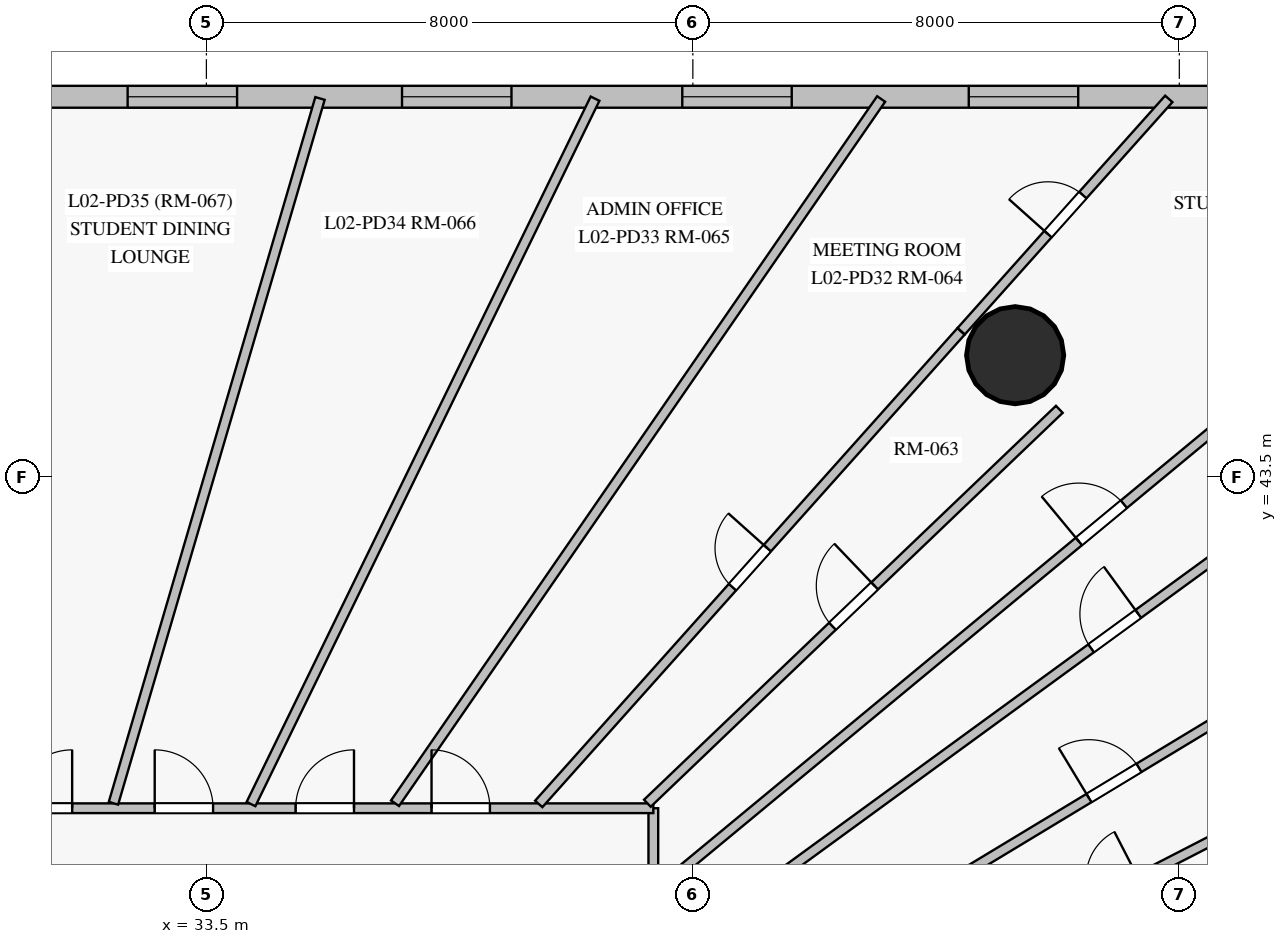
"""IFC4 building model, lengths in metres.
Left out: names, types, materials, properties, quantities, classifications, styles, units other than length and angle.
Written with IfcOpenShell. Run it as: python <this file> out.ifc"""

import sys

from ifc_helpers import new_model, si_unit, direction, frame, frame_2d, origin, origin_with_axes, origin_2d, place, context, subcontext, project, spatial, rectangle, circle, extrude, source, transform, mapped, element, fill, save


model = new_model("IFC4")
c1 = context("Model", 3, precision=1e-05, world=origin(), true_north=direction((0.0, 1.0)))
c2 = subcontext(c1, "Body", "Model", "MODEL_VIEW")
j1 = project(units=[si_unit("LENGTHUNIT", "METRE"), si_unit("PLANEANGLEUNIT", "RADIAN")], contexts=[c1])
p1 = place(None, origin())
s1 = spatial("IfcSite", under=j1, at=p1, CompositionType="ELEMENT")
p2 = place(p1, origin())
s2 = spatial("IfcBuilding", under=s1, at=p2, CompositionType="ELEMENT")
p3 = place(p2, frame((0.0, 0.0, 9.0)))
s3 = spatial("IfcBuildingStorey", under=s2, at=p3, CompositionType="ELEMENT", Elevation=9.0)
m1 = source(origin_with_axes(), c2, "Body", "SweptSolid", [
    extrude(circle(Radius=0.8, at=origin_2d()), origin(), (0.0, 0.0, 1.0), 4.5),
])
p4 = place(p3, frame((46.8, 45.5, 0.0), z_axis=(0.0, 0.0, 1.0), x_axis=(1.0, 0.0, 0.0)))
e1 = element("IfcColumn", 1, at=p4, inside=s3, PredefinedType="COLUMN", context=c2, shape_type="MappedRepresentation", body=[
    mapped(m1, transform((0.0, 0.0, 0.0), scale=1.0)),
])
p5 = place(p3, frame((54.6, 49.75, 0.0), z_axis=(0.0, 0.0, 1.0), x_axis=(-1.0, 0.0, 0.0)))
e2 = element("IfcWall", 2, at=p5, inside=s3, PredefinedType="SOLIDWALL", context=c2, shape_type="SweptSolid", body=[
    extrude(rectangle(XDim=49.25, YDim=0.36, at=frame_2d((24.625, 0.0))), origin(), (0.0, 0.0, 1.0), 4.2),
])
p6 = place(p5, frame((1.866, 0.0, 0.85)))
e3 = element("IfcOpeningElement", 3, at=p6, cuts=e2, PredefinedType="OPENING", context=c2, shape_type="SweptSolid", body=[
    extrude(rectangle(XDim=1.8, YDim=2.2, at=frame_2d((0.9, 1.1))), frame((0.0, 0.19, 0.0), z_axis=(0.0, -1.0, 0.0), x_axis=(1.0, 0.0, 0.0)), (0.0, 0.0, 1.0), 0.38),
])
p7 = place(p5, frame((6.763, 0.0, 0.85)))
e4 = element("IfcOpeningElement", 4, at=p7, cuts=e2, PredefinedType="OPENING", context=c2, shape_type="SweptSolid", body=[
    extrude(rectangle(XDim=1.8, YDim=2.2, at=frame_2d((0.9, 1.1))), frame((0.0, 0.19, 0.0), z_axis=(0.0, -1.0, 0.0), x_axis=(1.0, 0.0, 0.0)), (0.0, 0.0, 1.0), 0.38),
])
p8 = place(p5, frame((11.474, 0.0, 0.85)))
e5 = element("IfcOpeningElement", 5, at=p8, cuts=e2, PredefinedType="OPENING", context=c2, shape_type="SweptSolid", body=[
    extrude(rectangle(XDim=1.8, YDim=2.2, at=frame_2d((0.9, 1.1))), frame((0.0, 0.19, 0.0), z_axis=(0.0, -1.0, 0.0), x_axis=(1.0, 0.0, 0.0)), (0.0, 0.0, 1.0), 0.38),
])
p9 = place(p5, frame((16.083, 0.0, 0.85)))
e6 = element("IfcOpeningElement", 6, at=p9, cuts=e2, PredefinedType="OPENING", context=c2, shape_type="SweptSolid", body=[
    extrude(rectangle(XDim=1.8, YDim=2.2, at=frame_2d((0.9, 1.1))), frame((0.0, 0.19, 0.0), z_axis=(0.0, -1.0, 0.0), x_axis=(1.0, 0.0, 0.0)), (0.0, 0.0, 1.0), 0.38),
])
p10 = place(p5, frame((20.595, 0.0, 0.85)))
e7 = element("IfcOpeningElement", 7, at=p10, cuts=e2, PredefinedType="OPENING", context=c2, shape_type="SweptSolid", body=[
    extrude(rectangle(XDim=1.8, YDim=2.2, at=frame_2d((0.9, 1.1))), frame((0.0, 0.19, 0.0), z_axis=(0.0, -1.0, 0.0), x_axis=(1.0, 0.0, 0.0)), (0.0, 0.0, 1.0), 0.38),
])
p11 = place(p5, frame((24.23, 0.0, 0.85)))
e8 = element("IfcOpeningElement", 8, at=p11, cuts=e2, PredefinedType="OPENING", context=c2, shape_type="SweptSolid", body=[
    extrude(rectangle(XDim=1.8, YDim=2.2, at=frame_2d((0.9, 1.1))), frame((0.0, 0.19, 0.0), z_axis=(0.0, -1.0, 0.0), x_axis=(1.0, 0.0, 0.0)), (0.0, 0.0, 1.0), 0.38),
])
p12 = place(p5, frame((30.4, 0.0, 0.85)))
e9 = element("IfcOpeningElement", 9, at=p12, cuts=e2, PredefinedType="OPENING", context=c2, shape_type="SweptSolid", body=[
    extrude(rectangle(XDim=1.8, YDim=2.2, at=frame_2d((0.9, 1.1))), frame((0.0, 0.19, 0.0), z_axis=(0.0, -1.0, 0.0), x_axis=(1.0, 0.0, 0.0)), (0.0, 0.0, 1.0), 0.38),
])
p13 = place(p5, frame((35.42, 0.0, 0.85)))
e10 = element("IfcOpeningElement", 10, at=p13, cuts=e2, PredefinedType="OPENING", context=c2, shape_type="SweptSolid", body=[
    extrude(rectangle(XDim=1.8, YDim=2.2, at=frame_2d((0.9, 1.1))), frame((0.0, 0.19, 0.0), z_axis=(0.0, -1.0, 0.0), x_axis=(1.0, 0.0, 0.0)), (0.0, 0.0, 1.0), 0.38),
])
p14 = place(p5, frame((40.69, 0.0, 0.85)))
e11 = element("IfcOpeningElement", 11, at=p14, cuts=e2, PredefinedType="OPENING", context=c2, shape_type="SweptSolid", body=[
    extrude(rectangle(XDim=1.8, YDim=2.2, at=frame_2d((0.9, 1.1))), frame((0.0, 0.19, 0.0), z_axis=(0.0, -1.0, 0.0), x_axis=(1.0, 0.0, 0.0)), (0.0, 0.0, 1.0), 0.38),
])
p15 = place(p5, frame((45.58, 0.0, 0.85)))
e12 = element("IfcOpeningElement", 12, at=p15, cuts=e2, PredefinedType="OPENING", context=c2, shape_type="SweptSolid", body=[
    extrude(rectangle(XDim=1.8, YDim=2.2, at=frame_2d((0.9, 1.1))), frame((0.0, 0.19, 0.0), z_axis=(0.0, -1.0, 0.0), x_axis=(1.0, 0.0, 0.0)), (0.0, 0.0, 1.0), 0.38),
])
p16 = place(p3, frame((40.932, 36.712, 0.0), z_axis=(0.0, 0.0, 1.0), x_axis=(0.770350004389, 0.637621259635, 0.0)))
e13 = element("IfcWall", 13, at=p16, inside=s3, PredefinedType="PARTITIONING", context=c2, shape_type="SweptSolid", body=[
    extrude(rectangle(XDim=18.942, YDim=0.16, at=frame_2d((9.471, 0.0))), origin(), (0.0, 0.0, 1.0), 4.2),
])
p17 = place(p16, frame((8.979, 0.0, 0.0)))
e14 = element("IfcOpeningElement", 14, at=p17, cuts=e13, PredefinedType="OPENING", context=c2, shape_type="SweptSolid", body=[
    extrude(rectangle(XDim=0.96, YDim=2.15, at=frame_2d((0.48, 1.075))), frame((0.0, 0.09, 0.0), z_axis=(0.0, -1.0, 0.0), x_axis=(1.0, 0.0, 0.0)), (0.0, 0.0, 1.0), 0.18),
])
p18 = place(p3, frame((40.932, 35.49, 0.0), z_axis=(0.0, 0.0, 1.0), x_axis=(0.808014689356, 0.589162339076, 0.0)))
e15 = element("IfcWall", 15, at=p18, inside=s3, PredefinedType="PARTITIONING", context=c2, shape_type="SweptSolid", body=[
    extrude(rectangle(XDim=18.602, YDim=0.16, at=frame_2d((9.301, 0.0))), origin(), (0.0, 0.0, 1.0), 4.2),
])
p19 = place(p18, frame((8.808, 0.0, 0.0)))
e16 = element("IfcOpeningElement", 16, at=p19, cuts=e15, PredefinedType="OPENING", context=c2, shape_type="SweptSolid", body=[
    extrude(rectangle(XDim=0.96, YDim=2.15, at=frame_2d((0.48, 1.075))), frame((0.0, 0.09, 0.0), z_axis=(0.0, -1.0, 0.0), x_axis=(1.0, 0.0, 0.0)), (0.0, 0.0, 1.0), 0.18),
])
p20 = place(p3, frame((40.85, 38.05, 0.0), z_axis=(0.0, 0.0, 1.0), x_axis=(0.0, -1.0, 0.0)))
e17 = element("IfcWall", 17, at=p20, inside=s3, PredefinedType="PARTITIONING", context=c2, shape_type="SweptSolid", body=[
    extrude(rectangle(XDim=18.508, YDim=0.16, at=frame_2d((9.254, 0.0))), origin(), (0.0, 0.0, 1.0), 3.25),
])
p21 = place(p20, frame((13.87, 0.0, 0.0)))
e18 = element("IfcOpeningElement", 18, at=p21, cuts=e17, PredefinedType="OPENING", context=c2, shape_type="SweptSolid", body=[
    extrude(rectangle(XDim=0.96, YDim=2.15, at=frame_2d((0.48, 1.075))), frame((0.0, 0.09, 0.0), z_axis=(0.0, -1.0, 0.0), x_axis=(1.0, 0.0, 0.0)), (0.0, 0.0, 1.0), 0.18),
])
p22 = place(p20, frame((8.695, 0.0, 0.0)))
e19 = element("IfcOpeningElement", 19, at=p22, cuts=e17, PredefinedType="OPENING", context=c2, shape_type="SweptSolid", body=[
    extrude(rectangle(XDim=0.96, YDim=2.15, at=frame_2d((0.48, 1.075))), frame((0.0, 0.09, 0.0), z_axis=(0.0, -1.0, 0.0), x_axis=(1.0, 0.0, 0.0)), (0.0, 0.0, 1.0), 0.18),
])
p23 = place(p20, frame((6.334, 0.0, 0.0)))
e20 = element("IfcOpeningElement", 20, at=p23, cuts=e17, PredefinedType="OPENING", context=c2, shape_type="SweptSolid", body=[
    extrude(rectangle(XDim=0.96, YDim=2.15, at=frame_2d((0.48, 1.075))), frame((0.0, 0.09, 0.0), z_axis=(0.0, -1.0, 0.0), x_axis=(1.0, 0.0, 0.0)), (0.0, 0.0, 1.0), 0.18),
])
p24 = place(p20, frame((12.2, 0.0, 0.0)))
e21 = element("IfcOpeningElement", 21, at=p24, cuts=e17, PredefinedType="OPENING", context=c2, shape_type="SweptSolid", body=[
    extrude(rectangle(XDim=0.96, YDim=2.15, at=frame_2d((0.48, 1.075))), frame((0.0, 0.09, 0.0), z_axis=(0.0, -1.0, 0.0), x_axis=(1.0, 0.0, 0.0)), (0.0, 0.0, 1.0), 0.18),
])
p25 = place(p20, frame((2.76, 0.0, 0.0)))
e22 = element("IfcOpeningElement", 22, at=p25, cuts=e17, PredefinedType="OPENING", context=c2, shape_type="SweptSolid", body=[
    extrude(rectangle(XDim=0.86, YDim=2.04, at=frame_2d((0.43, 1.02))), frame((0.0, 0.09, 0.0), z_axis=(0.0, -1.0, 0.0), x_axis=(1.0, 0.0, 0.0)), (0.0, 0.0, 1.0), 0.18),
])
p26 = place(p20, frame((1.494, 0.0, 0.0)))
e23 = element("IfcOpeningElement", 23, at=p26, cuts=e17, PredefinedType="OPENING", context=c2, shape_type="SweptSolid", body=[
    extrude(rectangle(XDim=0.86, YDim=2.04, at=frame_2d((0.43, 1.02))), frame((0.0, 0.09, 0.0), z_axis=(0.0, -1.0, 0.0), x_axis=(1.0, 0.0, 0.0)), (0.0, 0.0, 1.0), 0.18),
])
p27 = place(p3, frame((40.919, 33.932, 0.0), z_axis=(0.0, 0.0, 1.0), x_axis=(0.855961001887, 0.517040388412, 0.0)))
e24 = element("IfcWall", 24, at=p27, inside=s3, PredefinedType="PARTITIONING", context=c2, shape_type="SweptSolid", body=[
    extrude(rectangle(XDim=17.579, YDim=0.16, at=frame_2d((8.789, 0.0))), origin(), (0.0, 0.0, 1.0), 4.2),
])
p28 = place(p27, frame((8.289, 0.0, 0.0)))
e25 = element("IfcOpeningElement", 25, at=p28, cuts=e24, PredefinedType="OPENING", context=c2, shape_type="SweptSolid", body=[
    extrude(rectangle(XDim=0.96, YDim=2.15, at=frame_2d((0.48, 1.075))), frame((0.0, 0.09, 0.0), z_axis=(0.0, -1.0, 0.0), x_axis=(1.0, 0.0, 0.0)), (0.0, 0.0, 1.0), 0.18),
])
p29 = place(p3, frame((40.919, 32.827, 0.0), z_axis=(0.0, 0.0, 1.0), x_axis=(0.8890624387, 0.457785954452, 0.0)))
e26 = element("IfcWall", 26, at=p29, inside=s3, PredefinedType="PARTITIONING", context=c2, shape_type="SweptSolid", body=[
    extrude(rectangle(XDim=16.927, YDim=0.16, at=frame_2d((8.464, 0.0))), origin(), (0.0, 0.0, 1.0), 4.2),
])
p30 = place(p29, frame((8.033, 0.0, 0.0)))
e27 = element("IfcOpeningElement", 27, at=p30, cuts=e26, PredefinedType="OPENING", context=c2, shape_type="SweptSolid", body=[
    extrude(rectangle(XDim=0.86, YDim=2.04, at=frame_2d((0.43, 1.02))), frame((0.0, 0.09, 0.0), z_axis=(0.0, -1.0, 0.0), x_axis=(1.0, 0.0, 0.0)), (0.0, 0.0, 1.0), 0.18),
])
p31 = place(p3, frame((40.932, 31.951, 0.0), z_axis=(0.0, 0.0, 1.0), x_axis=(0.914043329039, 0.405616558636, 0.0)))
e28 = element("IfcWall", 28, at=p31, inside=s3, PredefinedType="PARTITIONING", context=c2, shape_type="SweptSolid", body=[
    extrude(rectangle(XDim=16.452, YDim=0.16, at=frame_2d((8.226, 0.0))), origin(), (0.0, 0.0, 1.0), 4.2),
])
p32 = place(p31, frame((7.733, 0.0, 0.0)))
e29 = element("IfcOpeningElement", 29, at=p32, cuts=e28, PredefinedType="OPENING", context=c2, shape_type="SweptSolid", body=[
    extrude(rectangle(XDim=0.96, YDim=2.15, at=frame_2d((0.48, 1.075))), frame((0.0, 0.09, 0.0), z_axis=(0.0, -1.0, 0.0), x_axis=(1.0, 0.0, 0.0)), (0.0, 0.0, 1.0), 0.18),
])
p33 = place(p3, frame((25.4, 38.05, 0.0), z_axis=(0.0, 0.0, 1.0), x_axis=(1.0, 0.0, 0.0)))
e30 = element("IfcWall", 30, at=p33, inside=s3, PredefinedType="PARTITIONING", context=c2, shape_type="SweptSolid", body=[
    extrude(rectangle(XDim=15.45, YDim=0.16, at=frame_2d((7.725, 0.0))), origin(), (0.0, 0.0, 1.0), 4.2),
])
p34 = place(p33, frame((11.802, 0.0, 0.0)))
e31 = element("IfcOpeningElement", 31, at=p34, cuts=e30, PredefinedType="OPENING", context=c2, shape_type="SweptSolid", body=[
    extrude(rectangle(XDim=0.96, YDim=2.15, at=frame_2d((0.48, 1.075))), frame((0.0, 0.09, 0.0), z_axis=(0.0, -1.0, 0.0), x_axis=(1.0, 0.0, 0.0)), (0.0, 0.0, 1.0), 0.18),
])
p35 = place(p33, frame((9.567, 0.0, 0.0)))
e32 = element("IfcOpeningElement", 32, at=p35, cuts=e30, PredefinedType="OPENING", context=c2, shape_type="SweptSolid", body=[
    extrude(rectangle(XDim=0.96, YDim=2.15, at=frame_2d((0.48, 1.075))), frame((0.0, 0.09, 0.0), z_axis=(0.0, -1.0, 0.0), x_axis=(1.0, 0.0, 0.0)), (0.0, 0.0, 1.0), 0.18),
])
p36 = place(p33, frame((7.25, 0.0, 0.0)))
e33 = element("IfcOpeningElement", 33, at=p36, cuts=e30, PredefinedType="OPENING", context=c2, shape_type="SweptSolid", body=[
    extrude(rectangle(XDim=0.96, YDim=2.15, at=frame_2d((0.48, 1.075))), frame((0.0, 0.09, 0.0), z_axis=(0.0, -1.0, 0.0), x_axis=(1.0, 0.0, 0.0)), (0.0, 0.0, 1.0), 0.18),
])
p37 = place(p33, frame((4.933, 0.0, 0.0)))
e34 = element("IfcOpeningElement", 34, at=p37, cuts=e30, PredefinedType="OPENING", context=c2, shape_type="SweptSolid", body=[
    extrude(rectangle(XDim=0.96, YDim=2.15, at=frame_2d((0.48, 1.075))), frame((0.0, 0.09, 0.0), z_axis=(0.0, -1.0, 0.0), x_axis=(1.0, 0.0, 0.0)), (0.0, 0.0, 1.0), 0.18),
])
p38 = place(p33, frame((1.698, 0.0, 0.0)))
e35 = element("IfcOpeningElement", 35, at=p38, cuts=e30, PredefinedType="OPENING", context=c2, shape_type="SweptSolid", body=[
    extrude(rectangle(XDim=0.96, YDim=2.15, at=frame_2d((0.48, 1.075))), frame((0.0, 0.09, 0.0), z_axis=(0.0, -1.0, 0.0), x_axis=(1.0, 0.0, 0.0)), (0.0, 0.0, 1.0), 0.18),
])
p39 = place(p33, frame((3.164, 0.0, 0.0)))
e36 = element("IfcOpeningElement", 36, at=p39, cuts=e30, PredefinedType="OPENING", context=c2, shape_type="SweptSolid", body=[
    extrude(rectangle(XDim=0.86, YDim=2.04, at=frame_2d((0.43, 1.02))), frame((0.0, 0.09, 0.0), z_axis=(0.0, -1.0, 0.0), x_axis=(1.0, 0.0, 0.0)), (0.0, 0.0, 1.0), 0.18),
])
p40 = place(p3, frame((36.602, 38.132, 0.0), z_axis=(0.0, 0.0, 1.0), x_axis=(0.568083583137, 0.822970863743, 0.0)))
e37 = element("IfcWall", 37, at=p40, inside=s3, PredefinedType="PARTITIONING", context=c2, shape_type="SweptSolid", body=[
    extrude(rectangle(XDim=14.073, YDim=0.16, at=frame_2d((7.036, 0.0))), origin(), (0.0, 0.0, 1.0), 4.2),
])
p41 = place(p3, frame((34.233, 38.118, 0.0), z_axis=(0.0, 0.0, 1.0), x_axis=(0.438369218091, 0.898794986985, 0.0)))
e38 = element("IfcWall", 38, at=p41, inside=s3, PredefinedType="PARTITIONING", context=c2, shape_type="SweptSolid", body=[
    extrude(rectangle(XDim=12.906, YDim=0.16, at=frame_2d((6.453, 0.0))), origin(), (0.0, 0.0, 1.0), 4.2),
])
p42 = place(p3, frame((31.972, 38.132, 0.0), z_axis=(0.0, 0.0, 1.0), x_axis=(0.281237056868, 0.959638326582, 0.0)))
e39 = element("IfcWall", 39, at=p42, inside=s3, PredefinedType="PARTITIONING", context=c2, shape_type="SweptSolid", body=[
    extrude(rectangle(XDim=12.078, YDim=0.16, at=frame_2d((6.039, 0.0))), origin(), (0.0, 0.0, 1.0), 4.2),
])
p43 = place(p3, frame((38.966, 38.121, 0.0), z_axis=(0.0, 0.0, 1.0), x_axis=(0.666343454818, 0.745644955875, 0.0)))
e40 = element("IfcWall", 40, at=p43, inside=s3, PredefinedType="PARTITIONING", context=c2, shape_type="SweptSolid", body=[
    extrude(rectangle(XDim=10.421, YDim=0.16, at=frame_2d((5.21, 0.0))), origin(), (0.0, 0.0, 1.0), 4.2),
])
p44 = place(p43, frame((4.781, 0.0, 0.0)))
e41 = element("IfcOpeningElement", 41, at=p44, cuts=e40, PredefinedType="OPENING", context=c2, shape_type="SweptSolid", body=[
    extrude(rectangle(XDim=0.86, YDim=2.04, at=frame_2d((0.43, 1.02))), frame((0.0, 0.09, 0.0), z_axis=(0.0, -1.0, 0.0), x_axis=(1.0, 0.0, 0.0)), (0.0, 0.0, 1.0), 0.18),
])
p45 = place(p3, frame((40.752, 38.132, 0.0), z_axis=(0.0, 0.0, 1.0), x_axis=(0.722765157253, 0.69109371829, 0.0)))
e42 = element("IfcWall", 42, at=p45, inside=s3, PredefinedType="PARTITIONING", context=c2, shape_type="SweptSolid", body=[
    extrude(rectangle(XDim=9.374, YDim=0.16, at=frame_2d((4.687, 0.0))), origin(), (0.0, 0.0, 1.0), 3.25),
])
p46 = place(p45, frame((4.212, 0.0, 0.0)))
e43 = element("IfcOpeningElement", 43, at=p46, cuts=e42, PredefinedType="OPENING", context=c2, shape_type="SweptSolid", body=[
    extrude(rectangle(XDim=0.96, YDim=2.15, at=frame_2d((0.48, 1.075))), frame((0.0, 0.09, 0.0), z_axis=(0.0, -1.0, 0.0), x_axis=(1.0, 0.0, 0.0)), (0.0, 0.0, 1.0), 0.18),
])
p47 = place(p3, frame((45.913, 45.895, 0.0), z_axis=(0.0, 0.0, 1.0), x_axis=(0.666346204372, 0.745642498735, 0.0)))
e44 = element("IfcWall", 44, at=p47, inside=s3, PredefinedType="PARTITIONING", context=c2, shape_type="SweptSolid", body=[
    extrude(rectangle(XDim=5.123, YDim=0.16, at=frame_2d((2.562, 0.0))), origin(), (0.0, 0.0, 1.0), 4.2),
])
p48 = place(p47, frame((2.142, 0.0, 0.0)))
e45 = element("IfcOpeningElement", 45, at=p48, cuts=e44, PredefinedType="OPENING", context=c2, shape_type="SweptSolid", body=[
    extrude(rectangle(XDim=0.86, YDim=2.04, at=frame_2d((0.43, 1.02))), frame((0.0, 0.09, 0.0), z_axis=(0.0, -1.0, 0.0), x_axis=(1.0, 0.0, 0.0)), (0.0, 0.0, 1.0), 0.18),
])
m2 = source(origin_with_axes(), c2, "Body", "SweptSolid", [
    extrude(rectangle(XDim=1.8, YDim=2.2, at=frame_2d((0.9, 1.1))), frame((0.0, 0.03, 0.0), z_axis=(0.0, -1.0, 0.0), x_axis=(1.0, 0.0, 0.0)), (0.0, 0.0, 1.0), 0.06),
])
p49 = place(p7, origin())
e46 = element("IfcWindow", 46, at=p49, inside=s3, PartitioningType="SINGLE_PANEL", PredefinedType="WINDOW", context=c2, shape_type="MappedRepresentation", body=[
    mapped(m2, transform((0.0, 0.0, 0.0), scale=1.0)),
])
fill(e4, e46)
p50 = place(p8, origin())
e47 = element("IfcWindow", 47, at=p50, inside=s3, PartitioningType="SINGLE_PANEL", PredefinedType="WINDOW", context=c2, shape_type="MappedRepresentation", body=[
    mapped(m2, transform((0.0, 0.0, 0.0), scale=1.0)),
])
fill(e5, e47)
p51 = place(p9, origin())
e48 = element("IfcWindow", 48, at=p51, inside=s3, PartitioningType="SINGLE_PANEL", PredefinedType="WINDOW", context=c2, shape_type="MappedRepresentation", body=[
    mapped(m2, transform((0.0, 0.0, 0.0), scale=1.0)),
])
fill(e6, e48)
p52 = place(p10, origin())
e49 = element("IfcWindow", 49, at=p52, inside=s3, PartitioningType="SINGLE_PANEL", PredefinedType="WINDOW", context=c2, shape_type="MappedRepresentation", body=[
    mapped(m2, transform((0.0, 0.0, 0.0), scale=1.0)),
])
fill(e7, e49)
m3 = source(origin_with_axes(), c2, "Body", "SweptSolid", [
    extrude(rectangle(XDim=0.96, YDim=2.15, at=frame_2d((0.48, 1.075))), frame((0.0, 0.025, 0.0), z_axis=(0.0, -1.0, 0.0), x_axis=(1.0, 0.0, 0.0)), (0.0, 0.0, 1.0), 0.05),
])
p53 = place(p28, origin())
e50 = element("IfcDoor", 50, at=p53, inside=s3, OperationType="SINGLE_SWING_LEFT", PredefinedType="DOOR", context=c2, shape_type="MappedRepresentation", body=[
    mapped(m3, transform((0.0, 0.0, 0.0), scale=1.0)),
])
fill(e25, e50)
p54 = place(p19, origin())
e51 = element("IfcDoor", 51, at=p54, inside=s3, OperationType="SINGLE_SWING_RIGHT", PredefinedType="DOOR", context=c2, shape_type="MappedRepresentation", body=[
    mapped(m3, transform((0.0, 0.0, 0.0), scale=1.0)),
])
fill(e16, e51)
p55 = place(p17, origin())
e52 = element("IfcDoor", 52, at=p55, inside=s3, OperationType="SINGLE_SWING_LEFT", PredefinedType="DOOR", context=c2, shape_type="MappedRepresentation", body=[
    mapped(m3, transform((0.0, 0.0, 0.0), scale=1.0)),
])
fill(e14, e52)
p56 = place(p46, origin())
e53 = element("IfcDoor", 53, at=p56, inside=s3, OperationType="SINGLE_SWING_RIGHT", PredefinedType="DOOR", context=c2, shape_type="MappedRepresentation", body=[
    mapped(m3, transform((0.0, 0.0, 0.0), scale=1.0)),
])
fill(e43, e53)
p57 = place(p34, origin())
e54 = element("IfcDoor", 54, at=p57, inside=s3, OperationType="SINGLE_SWING_LEFT", PredefinedType="DOOR", context=c2, shape_type="MappedRepresentation", body=[
    mapped(m3, transform((0.0, 0.0, 0.0), scale=1.0)),
])
fill(e31, e54)
p58 = place(p35, origin())
e55 = element("IfcDoor", 55, at=p58, inside=s3, OperationType="SINGLE_SWING_RIGHT", PredefinedType="DOOR", context=c2, shape_type="MappedRepresentation", body=[
    mapped(m3, transform((0.0, 0.0, 0.0), scale=1.0)),
])
fill(e32, e55)
p59 = place(p36, origin())
e56 = element("IfcDoor", 56, at=p59, inside=s3, OperationType="SINGLE_SWING_LEFT", PredefinedType="DOOR", context=c2, shape_type="MappedRepresentation", body=[
    mapped(m3, transform((0.0, 0.0, 0.0), scale=1.0)),
])
fill(e33, e56)
p60 = place(p37, origin())
e57 = element("IfcDoor", 57, at=p60, inside=s3, OperationType="SINGLE_SWING_RIGHT", PredefinedType="DOOR", context=c2, shape_type="MappedRepresentation", body=[
    mapped(m3, transform((0.0, 0.0, 0.0), scale=1.0)),
])
fill(e34, e57)
m4 = source(origin_with_axes(), c2, "Body", "SweptSolid", [
    extrude(rectangle(XDim=0.86, YDim=2.04, at=frame_2d((0.43, 1.02))), frame((0.0, 0.025, 0.0), z_axis=(0.0, -1.0, 0.0), x_axis=(1.0, 0.0, 0.0)), (0.0, 0.0, 1.0), 0.05),
])
p61 = place(p48, origin())
e58 = element("IfcDoor", 58, at=p61, inside=s3, OperationType="SINGLE_SWING_LEFT", PredefinedType="DOOR", context=c2, shape_type="MappedRepresentation", body=[
    mapped(m4, transform((0.0, 0.0, 0.0), scale=1.0)),
])
fill(e45, e58)
p62 = place(p44, origin())
e59 = element("IfcDoor", 59, at=p62, inside=s3, OperationType="SINGLE_SWING_RIGHT", PredefinedType="DOOR", context=c2, shape_type="MappedRepresentation", body=[
    mapped(m4, transform((0.0, 0.0, 0.0), scale=1.0)),
])
fill(e41, e59)
save(model, sys.argv[1])
